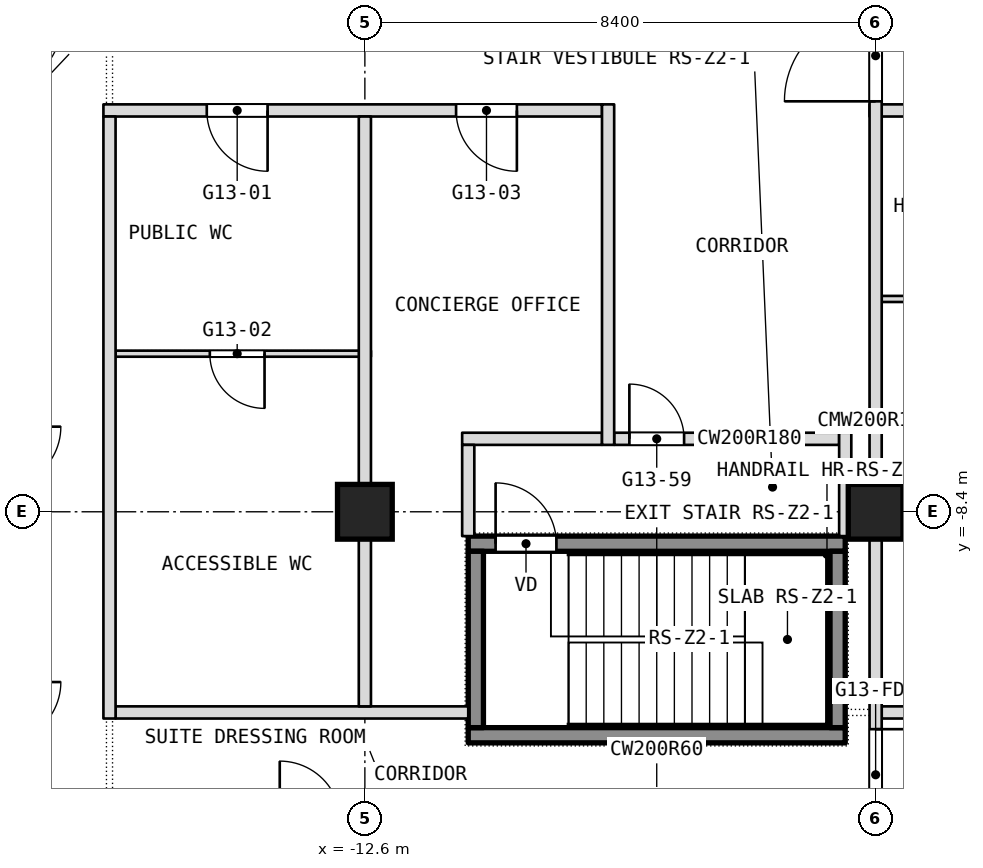
"""IFC4 building model, lengths in metres.
Left out: names, types, materials, properties, quantities, classifications, styles, units other than length and angle.
Written with IfcOpenShell. Run it as: python <this file> out.ifc"""

import sys

from ifc_helpers import new_model, si_unit, direction, frame, frame_2d, origin, origin_2d, place, context, subcontext, project, spatial, rectangle, extrude, element, fill, save


model = new_model("IFC4")
c1 = context("Model", 3, precision=1e-05, world=origin(), true_north=direction((0.0, 1.0)))
c2 = subcontext(c1, "Body", "Model", "MODEL_VIEW")
j1 = project(units=[si_unit("LENGTHUNIT", "METRE"), si_unit("PLANEANGLEUNIT", "RADIAN")], contexts=[c1])
p1 = place(None, origin())
s1 = spatial("IfcSite", under=j1, at=p1, CompositionType="ELEMENT")
p2 = place(p1, origin())
s2 = spatial("IfcBuilding", under=s1, at=p2, CompositionType="ELEMENT")
p3 = place(p2, frame((0.0, 0.0, 148.1)))
s3 = spatial("IfcBuildingStorey", under=s2, at=p3, CompositionType="ELEMENT", Elevation=148.1)
for number, where, z_axis, x_axis in (
    (1, (-12.6, -8.4, 0.0), (0.0, 0.0, 1.0), (1.0, 0.0, 0.0)),
    (2, (-4.2, -8.4, 0.0), (0.0, 0.0, 1.0), (1.0, 0.0, 0.0)),
):
    element("IfcColumn", number, at=place(p3, frame(where, z_axis=z_axis, x_axis=x_axis)), inside=s3, PredefinedType="COLUMN", context=c2, shape_type="SweptSolid", body=[
        extrude(rectangle(XDim=0.9, YDim=0.9, at=origin_2d()), origin(), (0.0, 0.0, 1.0), 3.6),
    ])
p4 = place(p3, frame((-16.7, -11.7, 0.0), z_axis=(0.0, 0.0, 1.0), x_axis=(1.0, 0.0, 0.0)))
e3 = element("IfcWall", 3, at=p4, inside=s3, PredefinedType="PARTITIONING", context=c2, shape_type="SweptSolid", body=[
    extrude(rectangle(XDim=5.8, YDim=0.2, at=frame_2d((2.9, 0.0))), origin(), (0.0, 0.0, 1.0), 3.34),
])
p5 = place(p3, frame((-4.1, -11.7, 0.0), z_axis=(0.0, 0.0, 1.0), x_axis=(1.0, 0.0, 0.0)))
e4 = element("IfcWall", 4, at=p5, inside=s3, PredefinedType="PARTITIONING", context=c2, shape_type="SweptSolid", body=[
    extrude(rectangle(XDim=20.8, YDim=0.2, at=frame_2d((10.4, 0.0))), origin(), (0.0, 0.0, 1.0), 3.34),
])
p6 = place(p5, frame((14.1, 0.0, 0.0)))
e5 = element("IfcOpeningElement", 5, at=p6, cuts=e4, PredefinedType="OPENING", context=c2, shape_type="SweptSolid", body=[
    extrude(rectangle(XDim=1.0, YDim=2.1, at=frame_2d((0.5, 1.05))), frame((0.0, 0.1, 0.0), z_axis=(0.0, -1.0, 0.0), x_axis=(1.0, 0.0, 0.0)), (0.0, 0.0, 1.0), 0.2),
])
p7 = place(p5, frame((5.7, 0.0, 0.0)))
e6 = element("IfcOpeningElement", 6, at=p7, cuts=e4, PredefinedType="OPENING", context=c2, shape_type="SweptSolid", body=[
    extrude(rectangle(XDim=1.0, YDim=2.1, at=frame_2d((0.5, 1.05))), frame((0.0, 0.1, 0.0), z_axis=(0.0, -1.0, 0.0), x_axis=(1.0, 0.0, 0.0)), (0.0, 0.0, 1.0), 0.2),
])
p8 = place(p3, frame((-11.0, -7.2, 0.0), z_axis=(0.0, 0.0, 1.0), x_axis=(1.0, 0.0, 0.0)))
e7 = element("IfcWall", 7, at=p8, inside=s3, PredefinedType="PARTITIONING", context=c2, shape_type="SweptSolid", body=[
    extrude(rectangle(XDim=2.3, YDim=0.2, at=frame_2d((1.15, 0.0))), origin(), (0.0, 0.0, 1.0), 3.34),
])
p9 = place(p3, frame((-8.5, -7.2, 0.0), z_axis=(0.0, 0.0, 1.0), x_axis=(1.0, 0.0, 0.0)))
e8 = element("IfcWall", 8, at=p9, inside=s3, PredefinedType="PARTITIONING", context=c2, shape_type="SweptSolid", body=[
    extrude(rectangle(XDim=3.7, YDim=0.2, at=frame_2d((1.85, 0.0))), origin(), (0.0, 0.0, 1.0), 3.34),
])
p10 = place(p9, frame((0.25, 0.0, 0.0)))
e9 = element("IfcOpeningElement", 9, at=p10, cuts=e8, PredefinedType="OPENING", context=c2, shape_type="SweptSolid", body=[
    extrude(rectangle(XDim=0.9, YDim=2.1, at=frame_2d((0.45, 1.05))), frame((0.0, 0.1, 0.0), z_axis=(0.0, -1.0, 0.0), x_axis=(1.0, 0.0, 0.0)), (0.0, 0.0, 1.0), 0.2),
])
p11 = place(p3, frame((-16.7, -5.8, 0.0), z_axis=(0.0, 0.0, 1.0), x_axis=(1.0, 0.0, 0.0)))
e10 = element("IfcWall", 10, at=p11, inside=s3, PredefinedType="PARTITIONING", context=c2, shape_type="SweptSolid", body=[
    extrude(rectangle(XDim=4.2, YDim=0.1, at=frame_2d((2.1, 0.0))), origin(), (0.0, 0.0, 1.0), 3.34),
])
p12 = place(p11, frame((1.55, 0.0, 0.0)))
e11 = element("IfcOpeningElement", 11, at=p12, cuts=e10, PredefinedType="OPENING", context=c2, shape_type="SweptSolid", body=[
    extrude(rectangle(XDim=0.9, YDim=2.1, at=frame_2d((0.45, 1.05))), frame((0.0, 0.05, 0.0), z_axis=(0.0, -1.0, 0.0), x_axis=(1.0, 0.0, 0.0)), (0.0, 0.0, 1.0), 0.1),
])
p13 = place(p3, frame((-4.1, -4.9, 0.0), z_axis=(0.0, 0.0, 1.0), x_axis=(1.0, 0.0, 0.0)))
e12 = element("IfcWall", 12, at=p13, inside=s3, PredefinedType="PARTITIONING", context=c2, shape_type="SweptSolid", body=[
    extrude(rectangle(XDim=4.2, YDim=0.1, at=frame_2d((2.1, 0.0))), origin(), (0.0, 0.0, 1.0), 3.34),
])
p14 = place(p13, frame((1.55, 0.0, 0.0)))
e13 = element("IfcOpeningElement", 13, at=p14, cuts=e12, PredefinedType="OPENING", context=c2, shape_type="SweptSolid", body=[
    extrude(rectangle(XDim=0.9, YDim=2.1, at=frame_2d((0.45, 1.05))), frame((0.0, 0.05, 0.0), z_axis=(0.0, -1.0, 0.0), x_axis=(1.0, 0.0, 0.0)), (0.0, 0.0, 1.0), 0.1),
])
p15 = place(p3, frame((-16.9, -1.8, 0.0), z_axis=(0.0, 0.0, 1.0), x_axis=(1.0, 0.0, 0.0)))
e14 = element("IfcWall", 14, at=p15, inside=s3, PredefinedType="PARTITIONING", context=c2, shape_type="SweptSolid", body=[
    extrude(rectangle(XDim=8.2, YDim=0.2, at=frame_2d((4.1, 0.0))), origin(), (0.0, 0.0, 1.0), 3.34),
])
p16 = place(p15, frame((1.7, 0.0, 0.0)))
e15 = element("IfcOpeningElement", 15, at=p16, cuts=e14, PredefinedType="OPENING", context=c2, shape_type="SweptSolid", body=[
    extrude(rectangle(XDim=1.0, YDim=2.1, at=frame_2d((0.5, 1.05))), frame((0.0, 0.1, 0.0), z_axis=(0.0, -1.0, 0.0), x_axis=(1.0, 0.0, 0.0)), (0.0, 0.0, 1.0), 0.2),
])
p17 = place(p15, frame((5.8, 0.0, 0.0)))
e16 = element("IfcOpeningElement", 16, at=p17, cuts=e14, PredefinedType="OPENING", context=c2, shape_type="SweptSolid", body=[
    extrude(rectangle(XDim=1.0, YDim=2.1, at=frame_2d((0.5, 1.05))), frame((0.0, 0.1, 0.0), z_axis=(0.0, -1.0, 0.0), x_axis=(1.0, 0.0, 0.0)), (0.0, 0.0, 1.0), 0.2),
])
p18 = place(p3, frame((-4.3, -1.8, 0.0), z_axis=(0.0, 0.0, 1.0), x_axis=(1.0, 0.0, 0.0)))
e17 = element("IfcWall", 17, at=p18, inside=s3, PredefinedType="PARTITIONING", context=c2, shape_type="SweptSolid", body=[
    extrude(rectangle(XDim=11.3, YDim=0.2, at=frame_2d((5.65, 0.0))), origin(), (0.0, 0.0, 1.0), 3.34),
])
p19 = place(p18, frame((1.7, 0.0, 0.0)))
e18 = element("IfcOpeningElement", 18, at=p19, cuts=e17, PredefinedType="OPENING", context=c2, shape_type="SweptSolid", body=[
    extrude(rectangle(XDim=1.0, YDim=2.1, at=frame_2d((0.5, 1.05))), frame((0.0, 0.1, 0.0), z_axis=(0.0, -1.0, 0.0), x_axis=(1.0, 0.0, 0.0)), (0.0, 0.0, 1.0), 0.2),
])
p20 = place(p18, frame((10.1, 0.0, 0.0)))
e19 = element("IfcOpeningElement", 19, at=p20, cuts=e17, PredefinedType="OPENING", context=c2, shape_type="SweptSolid", body=[
    extrude(rectangle(XDim=1.0, YDim=2.1, at=frame_2d((0.5, 1.05))), frame((0.0, 0.1, 0.0), z_axis=(0.0, -1.0, 0.0), x_axis=(1.0, 0.0, 0.0)), (0.0, 0.0, 1.0), 0.2),
])
p21 = place(p18, frame((5.9, 0.0, 0.0)))
e20 = element("IfcOpeningElement", 20, at=p21, cuts=e17, PredefinedType="OPENING", context=c2, shape_type="SweptSolid", body=[
    extrude(rectangle(XDim=1.0, YDim=2.1, at=frame_2d((0.5, 1.05))), frame((0.0, 0.1, 0.0), z_axis=(0.0, -1.0, 0.0), x_axis=(1.0, 0.0, 0.0)), (0.0, 0.0, 1.0), 0.2),
])
p22 = place(p3, frame((-4.2, -13.8, 0.0), z_axis=(0.0, 0.0, 1.0), x_axis=(0.0, 1.0, 0.0)))
e21 = element("IfcWall", 21, at=p22, inside=s3, PredefinedType="PARTITIONING", context=c2, shape_type="SweptSolid", body=[
    extrude(rectangle(XDim=13.8, YDim=0.2, at=frame_2d((6.9, 0.0))), origin(), (0.0, 0.0, 1.0), 3.34),
])
p23 = place(p22, frame((12.15, 0.0, 0.0)))
e22 = element("IfcOpeningElement", 22, at=p23, cuts=e21, PredefinedType="OPENING", context=c2, shape_type="SweptSolid", body=[
    extrude(rectangle(XDim=1.5, YDim=2.1, at=frame_2d((0.75, 1.05))), frame((0.0, 0.1, 0.0), z_axis=(0.0, -1.0, 0.0), x_axis=(1.0, 0.0, 0.0)), (0.0, 0.0, 1.0), 0.2),
])
p24 = place(p22, frame((0.325, 0.0, 0.0)))
e23 = element("IfcOpeningElement", 23, at=p24, cuts=e21, PredefinedType="OPENING", context=c2, shape_type="SweptSolid", body=[
    extrude(rectangle(XDim=1.5, YDim=2.1, at=frame_2d((0.75, 1.05))), frame((0.0, 0.1, 0.0), z_axis=(0.0, -1.0, 0.0), x_axis=(1.0, 0.0, 0.0)), (0.0, 0.0, 1.0), 0.2),
])
p25 = place(p3, frame((-4.7, -8.8, 0.0), z_axis=(0.0, 0.0, 1.0), x_axis=(0.0, 1.0, 0.0)))
e24 = element("IfcWall", 24, at=p25, inside=s3, PredefinedType="PARTITIONING", context=c2, shape_type="SweptSolid", body=[
    extrude(rectangle(XDim=1.7, YDim=0.2, at=frame_2d((0.85, 0.0))), origin(), (0.0, 0.0, 1.0), 3.34),
])
p26 = place(p3, frame((-8.6, -7.3, 0.0), z_axis=(0.0, 0.0, 1.0), x_axis=(0.0, 1.0, 0.0)))
e25 = element("IfcWall", 25, at=p26, inside=s3, PredefinedType="PARTITIONING", context=c2, shape_type="SweptSolid", body=[
    extrude(rectangle(XDim=5.6, YDim=0.2, at=frame_2d((2.8, 0.0))), origin(), (0.0, 0.0, 1.0), 3.34),
])
p27 = place(p3, frame((-10.9, -8.8, 0.0), z_axis=(0.0, 0.0, 1.0), x_axis=(0.0, 1.0, 0.0)))
e26 = element("IfcWall", 26, at=p27, inside=s3, PredefinedType="PARTITIONING", context=c2, shape_type="SweptSolid", body=[
    extrude(rectangle(XDim=1.5, YDim=0.2, at=frame_2d((0.75, 0.0))), origin(), (0.0, 0.0, 1.0), 3.34),
])
p28 = place(p3, frame((-12.6, -11.6, 0.0), z_axis=(0.0, 0.0, 1.0), x_axis=(0.0, 1.0, 0.0)))
e27 = element("IfcWall", 27, at=p28, inside=s3, PredefinedType="PARTITIONING", context=c2, shape_type="SweptSolid", body=[
    extrude(rectangle(XDim=9.7, YDim=0.2, at=frame_2d((4.85, 0.0))), origin(), (0.0, 0.0, 1.0), 3.34),
])
p29 = place(p3, frame((-16.8, -11.8, 0.0), z_axis=(0.0, 0.0, 1.0), x_axis=(0.0, 1.0, 0.0)))
e28 = element("IfcWall", 28, at=p29, inside=s3, PredefinedType="PARTITIONING", context=c2, shape_type="SweptSolid", body=[
    extrude(rectangle(XDim=9.9, YDim=0.2, at=frame_2d((4.95, 0.0))), origin(), (0.0, 0.0, 1.0), 3.34),
])
p30 = place(p3, frame((-10.9, -12.075, 0.1), z_axis=(0.0, 0.0, 1.0), x_axis=(1.0, 0.0, 0.0)))
e29 = element("IfcWall", 29, at=p30, inside=s3, PredefinedType="SHEAR", context=c2, shape_type="SweptSolid", body=[
    extrude(rectangle(XDim=6.2, YDim=0.25, at=frame_2d((3.1, 0.0))), origin(), (0.0, 0.0, 1.0), 3.6),
])
p31 = place(p3, frame((-10.9, -8.925, 0.1), z_axis=(0.0, 0.0, 1.0), x_axis=(1.0, 0.0, 0.0)))
e30 = element("IfcWall", 30, at=p31, inside=s3, PredefinedType="SHEAR", context=c2, shape_type="SweptSolid", body=[
    extrude(rectangle(XDim=6.2, YDim=0.25, at=frame_2d((3.1, 0.0))), origin(), (0.0, 0.0, 1.0), 3.6),
])
p32 = place(p31, frame((0.45, 0.0, 0.0)))
e31 = element("IfcOpeningElement", 31, at=p32, cuts=e30, PredefinedType="OPENING", context=c2, shape_type="SweptSolid", body=[
    extrude(rectangle(XDim=1.0, YDim=2.1, at=frame_2d((0.5, 1.05))), frame((0.0, 0.125, 0.0), z_axis=(0.0, -1.0, 0.0), x_axis=(1.0, 0.0, 0.0)), (0.0, 0.0, 1.0), 0.25),
])
for number, where, z_axis, x_axis in (
    (32, (-10.775, -11.95, 0.1), (0.0, 0.0, 1.0), (0.0, 1.0, 0.0)),
    (33, (-4.825, -11.95, 0.1), (0.0, 0.0, 1.0), (0.0, 1.0, 0.0)),
):
    element("IfcWall", number, at=place(p3, frame(where, z_axis=z_axis, x_axis=x_axis)), inside=s3, PredefinedType="SHEAR", context=c2, shape_type="SweptSolid", body=[
        extrude(rectangle(XDim=2.9, YDim=0.25, at=frame_2d((1.45, 0.0))), origin(), (0.0, 0.0, 1.0), 3.6),
    ])
p33 = place(p10, origin())
e34 = element("IfcDoor", 34, at=p33, inside=s3, OperationType="SINGLE_SWING_RIGHT", PredefinedType="DOOR", context=c2, shape_type="SweptSolid", body=[
    extrude(rectangle(XDim=0.9, YDim=2.1, at=frame_2d((0.45, 1.05))), frame((0.0, 0.025, 0.0), z_axis=(0.0, -1.0, 0.0), x_axis=(1.0, 0.0, 0.0)), (0.0, 0.0, 1.0), 0.05),
])
fill(e9, e34)
p34 = place(p12, origin())
e35 = element("IfcDoor", 35, at=p34, inside=s3, OperationType="SINGLE_SWING_RIGHT", PredefinedType="DOOR", context=c2, shape_type="SweptSolid", body=[
    extrude(rectangle(XDim=0.9, YDim=2.1, at=frame_2d((0.45, 1.05))), frame((0.0, 0.025, 0.0), z_axis=(0.0, -1.0, 0.0), x_axis=(1.0, 0.0, 0.0)), (0.0, 0.0, 1.0), 0.05),
])
fill(e11, e35)
p35 = place(p16, origin())
e36 = element("IfcDoor", 36, at=p35, inside=s3, OperationType="SINGLE_SWING_LEFT", PredefinedType="DOOR", context=c2, shape_type="SweptSolid", body=[
    extrude(rectangle(XDim=1.0, YDim=2.1, at=frame_2d((0.5, 1.05))), frame((0.0, 0.025, 0.0), z_axis=(0.0, -1.0, 0.0), x_axis=(1.0, 0.0, 0.0)), (0.0, 0.0, 1.0), 0.05),
])
fill(e15, e36)
p36 = place(p17, origin())
e37 = element("IfcDoor", 37, at=p36, inside=s3, OperationType="SINGLE_SWING_LEFT", PredefinedType="DOOR", context=c2, shape_type="SweptSolid", body=[
    extrude(rectangle(XDim=1.0, YDim=2.1, at=frame_2d((0.5, 1.05))), frame((0.0, 0.025, 0.0), z_axis=(0.0, -1.0, 0.0), x_axis=(1.0, 0.0, 0.0)), (0.0, 0.0, 1.0), 0.05),
])
fill(e16, e37)
p37 = place(p32, origin())
e38 = element("IfcDoor", 38, at=p37, inside=s3, OperationType="SINGLE_SWING_LEFT", PredefinedType="DOOR", context=c2, shape_type="SweptSolid", body=[
    extrude(rectangle(XDim=1.0, YDim=2.1, at=frame_2d((0.5, 1.05))), frame((0.0, 0.025, 0.0), z_axis=(0.0, -1.0, 0.0), x_axis=(1.0, 0.0, 0.0)), (0.0, 0.0, 1.0), 0.05),
])
fill(e31, e38)
p38 = place(p23, origin())
e39 = element("IfcDoor", 39, at=p38, inside=s3, OperationType="DOUBLE_DOOR_DOUBLE_SWING", PredefinedType="DOOR", context=c2, shape_type="SweptSolid", body=[
    extrude(rectangle(XDim=1.5, YDim=2.1, at=frame_2d((0.75, 1.05))), frame((0.0, 0.025, 0.0), z_axis=(0.0, -1.0, 0.0), x_axis=(1.0, 0.0, 0.0)), (0.0, 0.0, 1.0), 0.05),
])
fill(e22, e39)
p39 = place(p24, origin())
e40 = element("IfcDoor", 40, at=p39, inside=s3, OperationType="DOUBLE_DOOR_DOUBLE_SWING", PredefinedType="DOOR", context=c2, shape_type="SweptSolid", body=[
    extrude(rectangle(XDim=1.5, YDim=2.1, at=frame_2d((0.75, 1.05))), frame((0.0, 0.025, 0.0), z_axis=(0.0, -1.0, 0.0), x_axis=(1.0, 0.0, 0.0)), (0.0, 0.0, 1.0), 0.05),
])
fill(e23, e40)
save(model, sys.argv[1])
